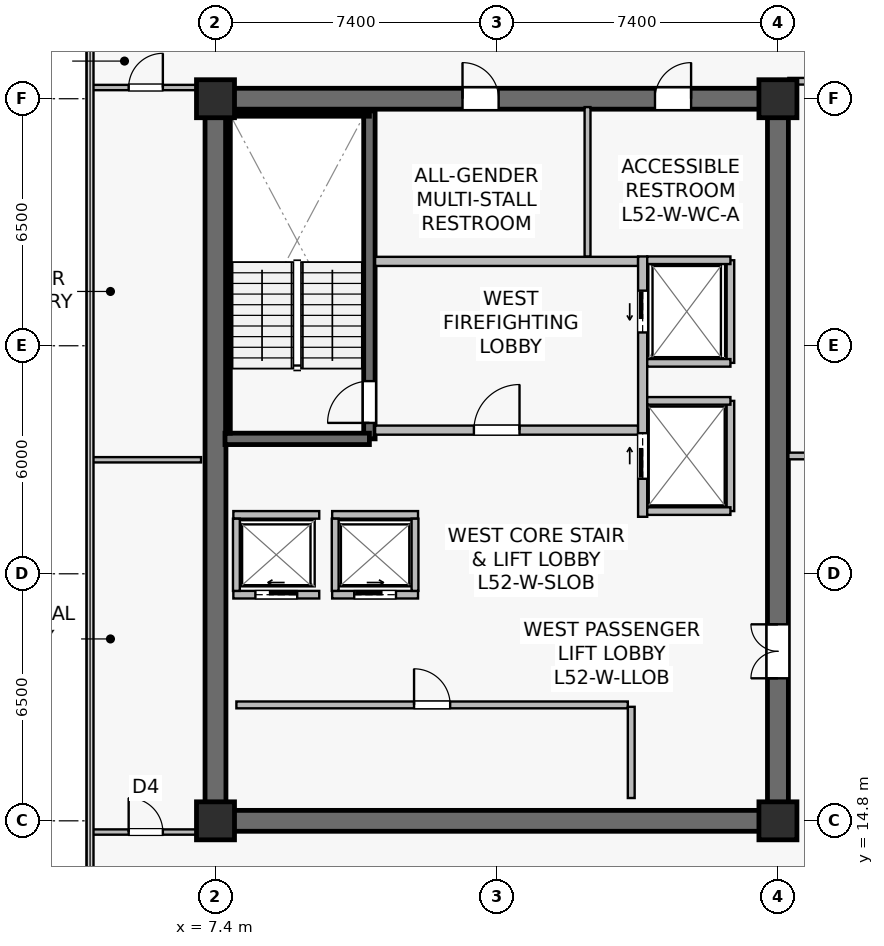
"""IFC4 building model, lengths in metres.
Left out: names, types, materials, properties, quantities, classifications, styles, units other than length and angle.
Written with IfcOpenShell. Run it as: python <this file> out.ifc"""

import sys

from ifc_helpers import new_model, si_unit, direction, frame, frame_2d, origin, origin_2d, place, context, subcontext, project, spatial, rectangle, extrude, source, transform, mapped, element, fill, save


model = new_model("IFC4")
c1 = context("Model", 3, precision=1e-05, world=origin(), true_north=direction((0.0, 1.0)))
c2 = subcontext(c1, "Body", "Model", "MODEL_VIEW")
j1 = project(units=[si_unit("LENGTHUNIT", "METRE"), si_unit("PLANEANGLEUNIT", "RADIAN")], contexts=[c1])
p1 = place(None, origin())
s1 = spatial("IfcSite", under=j1, at=p1, CompositionType="ELEMENT")
p2 = place(p1, origin())
s2 = spatial("IfcBuilding", under=s1, at=p2, CompositionType="ELEMENT")
p3 = place(p2, frame((0.0, 0.0, 217.8)))
s3 = spatial("IfcBuildingStorey", under=s2, at=p3, CompositionType="ELEMENT", Elevation=217.8)
p4 = place(p3, frame((7.125, 14.8, 0.0), z_axis=(0.0, 0.0, 1.0), x_axis=(1.0, 0.0, 0.0)))
e1 = element("IfcWall", 1, at=p4, inside=s3, PredefinedType="SHEAR", context=c2, shape_type="SweptSolid", body=[
    extrude(rectangle(XDim=15.35, YDim=0.55, at=frame_2d((7.675, 0.0))), origin(), (0.0, 0.0, 1.0), 3.8),
])
p5 = place(p3, frame((7.125, 33.8, 0.0), z_axis=(0.0, 0.0, 1.0), x_axis=(1.0, 0.0, 0.0)))
e2 = element("IfcWall", 2, at=p5, inside=s3, PredefinedType="SHEAR", context=c2, shape_type="SweptSolid", body=[
    extrude(rectangle(XDim=15.35, YDim=0.55, at=frame_2d((7.675, 0.0))), origin(), (0.0, 0.0, 1.0), 3.8),
])
p6 = place(p5, frame((6.775, 0.0, 0.0)))
e3 = element("IfcOpeningElement", 3, at=p6, cuts=e2, PredefinedType="OPENING", context=c2, shape_type="SweptSolid", body=[
    extrude(rectangle(XDim=0.95, YDim=2.15, at=frame_2d((0.475, 1.075))), frame((0.0, 0.285, 0.0), z_axis=(0.0, -1.0, 0.0), x_axis=(1.0, 0.0, 0.0)), (0.0, 0.0, 1.0), 0.57),
])
p7 = place(p5, frame((11.84, 0.0, 0.0)))
e4 = element("IfcOpeningElement", 4, at=p7, cuts=e2, PredefinedType="OPENING", context=c2, shape_type="SweptSolid", body=[
    extrude(rectangle(XDim=0.95, YDim=2.15, at=frame_2d((0.475, 1.075))), frame((0.0, 0.285, 0.0), z_axis=(0.0, -1.0, 0.0), x_axis=(1.0, 0.0, 0.0)), (0.0, 0.0, 1.0), 0.57),
])
p8 = place(p3, frame((7.4, 15.075, 0.0), z_axis=(0.0, 0.0, 1.0), x_axis=(0.0, 1.0, 0.0)))
e5 = element("IfcWall", 5, at=p8, inside=s3, PredefinedType="SHEAR", context=c2, shape_type="SweptSolid", body=[
    extrude(rectangle(XDim=18.45, YDim=0.55, at=frame_2d((9.225, 0.0))), origin(), (0.0, 0.0, 1.0), 3.8),
])
p9 = place(p3, frame((22.2, 15.075, 0.0), z_axis=(0.0, 0.0, 1.0), x_axis=(0.0, 1.0, 0.0)))
e6 = element("IfcWall", 6, at=p9, inside=s3, PredefinedType="SHEAR", context=c2, shape_type="SweptSolid", body=[
    extrude(rectangle(XDim=18.45, YDim=0.55, at=frame_2d((9.225, 0.0))), origin(), (0.0, 0.0, 1.0), 3.8),
])
p10 = place(p9, frame((3.475, 0.0, 0.0)))
e7 = element("IfcOpeningElement", 7, at=p10, cuts=e6, PredefinedType="OPENING", context=c2, shape_type="SweptSolid", body=[
    extrude(rectangle(XDim=1.42, YDim=2.2, at=frame_2d((0.71, 1.1))), frame((0.0, 0.285, 0.0), z_axis=(0.0, -1.0, 0.0), x_axis=(1.0, 0.0, 0.0)), (0.0, 0.0, 1.0), 0.57),
])
p11 = place(p3, frame((11.45, 24.85, 0.0), z_axis=(0.0, 0.0, 1.0), x_axis=(0.0, 1.0, 0.0)))
e8 = element("IfcWall", 8, at=p11, inside=s3, PredefinedType="SHEAR", context=c2, shape_type="SweptSolid", body=[
    extrude(rectangle(XDim=8.63, YDim=0.3, at=frame_2d((4.315, 0.0))), origin(), (0.0, 0.0, 1.0), 3.8),
])
p12 = place(p11, frame((0.42, 0.0, 0.0)))
e9 = element("IfcOpeningElement", 9, at=p12, cuts=e8, PredefinedType="OPENING", context=c2, shape_type="SweptSolid", body=[
    extrude(rectangle(XDim=1.1, YDim=2.15, at=frame_2d((0.55, 1.075))), frame((0.0, 0.16, 0.0), z_axis=(0.0, -1.0, 0.0), x_axis=(1.0, 0.0, 0.0)), (0.0, 0.0, 1.0), 0.32),
])
p13 = place(p3, frame((7.65, 24.85, 0.0), z_axis=(0.0, 0.0, 1.0), x_axis=(1.0, 0.0, 0.0)))
e10 = element("IfcWall", 10, at=p13, inside=s3, PredefinedType="SHEAR", context=c2, shape_type="SweptSolid", body=[
    extrude(rectangle(XDim=3.8, YDim=0.3, at=frame_2d((1.9, 0.0))), origin(), (0.0, 0.0, 1.0), 3.8),
])
p14 = place(p3, frame((7.73, 33.4, 0.0), z_axis=(0.0, 0.0, 1.0), x_axis=(1.0, 0.0, 0.0)))
e11 = element("IfcWall", 11, at=p14, inside=s3, PredefinedType="SOLIDWALL", context=c2, shape_type="SweptSolid", body=[
    extrude(rectangle(XDim=3.72, YDim=0.12, at=frame_2d((1.86, 0.0))), origin(), (0.0, 0.0, 1.0), 3.8),
])
p15 = place(p3, frame((7.73, 25.0, 0.0), z_axis=(0.0, 0.0, 1.0), x_axis=(0.0, 1.0, 0.0)))
e12 = element("IfcWall", 12, at=p15, inside=s3, PredefinedType="SOLIDWALL", context=c2, shape_type="SweptSolid", body=[
    extrude(rectangle(XDim=8.32, YDim=0.12, at=frame_2d((4.16, 0.0))), origin(), (0.0, 0.0, 1.0), 3.8),
])
m1 = source(origin(), c2, "Body", "SweptSolid", [
    extrude(rectangle(XDim=1.0, YDim=1.0, at=origin_2d()), origin(), (0.0, 0.0, 1.0), 4.1),
])
for number, where, z_axis, x_axis in (
    (13, (7.4, 14.8, 0.0), (0.0, 0.0, 1.0), (1.0, 0.0, 0.0)),
    (14, (22.2, 14.8, 0.0), (0.0, 0.0, 1.0), (1.0, 0.0, 0.0)),
    (15, (7.4, 33.8, 0.0), (0.0, 0.0, 1.0), (1.0, 0.0, 0.0)),
    (16, (22.2, 33.8, 0.0), (0.0, 0.0, 1.0), (1.0, 0.0, 0.0)),
):
    element("IfcColumn", number, at=place(p3, frame(where, z_axis=z_axis, x_axis=x_axis)), inside=s3, PredefinedType="COLUMN", context=c2, shape_type="MappedRepresentation", body=[
        mapped(m1, transform((0.0, 0.0, 0.0), scale=1.0)),
    ])
p16 = place(p3, frame((11.6, 25.08, 0.0), z_axis=(0.0, 0.0, 1.0), x_axis=(1.0, 0.0, 0.0)))
e17 = element("IfcWall", 17, at=p16, inside=s3, PredefinedType="SOLIDWALL", context=c2, shape_type="SweptSolid", body=[
    extrude(rectangle(XDim=6.92, YDim=0.24, at=frame_2d((3.46, 0.0))), origin(), (0.0, 0.0, 1.0), 3.197),
])
p17 = place(p16, frame((2.6, 0.0, 0.0)))
e18 = element("IfcOpeningElement", 18, at=p17, cuts=e17, PredefinedType="OPENING", context=c2, shape_type="SweptSolid", body=[
    extrude(rectangle(XDim=1.2, YDim=2.16, at=frame_2d((0.6, 1.08))), frame((0.0, 0.13, 0.0), z_axis=(0.0, -1.0, 0.0), x_axis=(1.0, 0.0, 0.0)), (0.0, 0.0, 1.0), 0.26),
])
p18 = place(p3, frame((11.6, 29.52, 0.0), z_axis=(0.0, 0.0, 1.0), x_axis=(1.0, 0.0, 0.0)))
e19 = element("IfcWall", 19, at=p18, inside=s3, PredefinedType="SOLIDWALL", context=c2, shape_type="SweptSolid", body=[
    extrude(rectangle(XDim=6.92, YDim=0.24, at=frame_2d((3.46, 0.0))), origin(), (0.0, 0.0, 1.0), 3.197),
])
p19 = place(p3, frame((18.64, 22.8, 0.0), z_axis=(0.0, 0.0, 1.0), x_axis=(0.0, 1.0, 0.0)))
e20 = element("IfcWall", 20, at=p19, inside=s3, PredefinedType="SOLIDWALL", context=c2, shape_type="SweptSolid", body=[
    extrude(rectangle(XDim=6.85, YDim=0.24, at=frame_2d((3.425, 0.0))), origin(), (0.0, 0.0, 1.0), 2.935),
])
p20 = place(p19, frame((4.85, 0.0, 0.0)))
e21 = element("IfcOpeningElement", 21, at=p20, cuts=e20, PredefinedType="OPENING", context=c2, shape_type="SweptSolid", body=[
    extrude(rectangle(XDim=1.1, YDim=2.22, at=frame_2d((0.55, 1.11))), frame((0.0, 0.13, 0.0), z_axis=(0.0, -1.0, 0.0), x_axis=(1.0, 0.0, 0.0)), (0.0, 0.0, 1.0), 0.26),
])
p21 = place(p19, frame((1.0, 0.0, 0.0)))
e22 = element("IfcOpeningElement", 22, at=p21, cuts=e20, PredefinedType="OPENING", context=c2, shape_type="SweptSolid", body=[
    extrude(rectangle(XDim=1.2, YDim=2.22, at=frame_2d((0.6, 1.11))), frame((0.0, 0.13, 0.0), z_axis=(0.0, -1.0, 0.0), x_axis=(1.0, 0.0, 0.0)), (0.0, 0.0, 1.0), 0.26),
])
p22 = place(p3, frame((7.87, 20.75, 0.0), z_axis=(0.0, 0.0, 1.0), x_axis=(1.0, 0.0, 0.0)))
e23 = element("IfcWall", 23, at=p22, inside=s3, PredefinedType="SOLIDWALL", context=c2, shape_type="SweptSolid", body=[
    extrude(rectangle(XDim=2.26, YDim=0.2, at=frame_2d((1.13, 0.0))), origin(), (0.0, 0.0, 1.0), 3.8),
])
p23 = place(p22, frame((0.58, 0.0, 0.0)))
e24 = element("IfcOpeningElement", 24, at=p23, cuts=e23, PredefinedType="OPENING", context=c2, shape_type="SweptSolid", body=[
    extrude(rectangle(XDim=1.1, YDim=2.22, at=frame_2d((0.55, 1.11))), frame((0.0, 0.11, 0.0), z_axis=(0.0, -1.0, 0.0), x_axis=(1.0, 0.0, 0.0)), (0.0, 0.0, 1.0), 0.22),
])
p24 = place(p3, frame((7.87, 22.85, 0.0), z_axis=(0.0, 0.0, 1.0), x_axis=(1.0, 0.0, 0.0)))
e25 = element("IfcWall", 25, at=p24, inside=s3, PredefinedType="SOLIDWALL", context=c2, shape_type="SweptSolid", body=[
    extrude(rectangle(XDim=2.26, YDim=0.2, at=frame_2d((1.13, 0.0))), origin(), (0.0, 0.0, 1.0), 3.8),
])
p25 = place(p3, frame((7.95, 20.85, 0.0), z_axis=(0.0, 0.0, 1.0), x_axis=(0.0, 1.0, 0.0)))
e26 = element("IfcWall", 26, at=p25, inside=s3, PredefinedType="SOLIDWALL", context=c2, shape_type="SweptSolid", body=[
    extrude(rectangle(XDim=1.9, YDim=0.18, at=frame_2d((0.95, 0.0))), origin(), (0.0, 0.0, 1.0), 3.8),
])
p26 = place(p3, frame((10.47, 20.75, 0.0), z_axis=(0.0, 0.0, 1.0), x_axis=(1.0, 0.0, 0.0)))
e27 = element("IfcWall", 27, at=p26, inside=s3, PredefinedType="SOLIDWALL", context=c2, shape_type="SweptSolid", body=[
    extrude(rectangle(XDim=2.26, YDim=0.2, at=frame_2d((1.13, 0.0))), origin(), (0.0, 0.0, 1.0), 3.8),
])
p27 = place(p26, frame((0.58, 0.0, 0.0)))
e28 = element("IfcOpeningElement", 28, at=p27, cuts=e27, PredefinedType="OPENING", context=c2, shape_type="SweptSolid", body=[
    extrude(rectangle(XDim=1.1, YDim=2.22, at=frame_2d((0.55, 1.11))), frame((0.0, 0.11, 0.0), z_axis=(0.0, -1.0, 0.0), x_axis=(1.0, 0.0, 0.0)), (0.0, 0.0, 1.0), 0.22),
])
p28 = place(p3, frame((10.47, 22.85, 0.0), z_axis=(0.0, 0.0, 1.0), x_axis=(1.0, 0.0, 0.0)))
e29 = element("IfcWall", 29, at=p28, inside=s3, PredefinedType="SOLIDWALL", context=c2, shape_type="SweptSolid", body=[
    extrude(rectangle(XDim=2.26, YDim=0.2, at=frame_2d((1.13, 0.0))), origin(), (0.0, 0.0, 1.0), 3.8),
])
for number, where, z_axis, x_axis in (
    (30, (10.55, 20.85, 0.0), (0.0, 0.0, 1.0), (0.0, 1.0, 0.0)),
    (31, (12.65, 20.85, 0.0), (0.0, 0.0, 1.0), (0.0, 1.0, 0.0)),
):
    element("IfcWall", number, at=place(p3, frame(where, z_axis=z_axis, x_axis=x_axis)), inside=s3, PredefinedType="SOLIDWALL", context=c2, shape_type="SweptSolid", body=[
        extrude(rectangle(XDim=1.9, YDim=0.18, at=frame_2d((0.95, 0.0))), origin(), (0.0, 0.0, 1.0), 3.8),
    ])
p29 = place(p3, frame((20.95, 26.85, 0.0), z_axis=(0.0, 0.0, 1.0), x_axis=(0.0, 1.0, 0.0)))
e32 = element("IfcWall", 32, at=p29, inside=s3, PredefinedType="SOLIDWALL", context=c2, shape_type="SweptSolid", body=[
    extrude(rectangle(XDim=2.7, YDim=0.2, at=frame_2d((1.35, 0.0))), origin(), (0.0, 0.0, 1.0), 3.8),
])
p30 = place(p3, frame((18.76, 29.55, 0.0), z_axis=(0.0, 0.0, 1.0), x_axis=(1.0, 0.0, 0.0)))
e33 = element("IfcWall", 33, at=p30, inside=s3, PredefinedType="SOLIDWALL", context=c2, shape_type="SweptSolid", body=[
    extrude(rectangle(XDim=2.19, YDim=0.2, at=frame_2d((1.095, 0.0))), origin(), (0.0, 0.0, 1.0), 3.8),
])
p31 = place(p3, frame((18.76, 26.85, 0.0), z_axis=(0.0, 0.0, 1.0), x_axis=(1.0, 0.0, 0.0)))
e34 = element("IfcWall", 34, at=p31, inside=s3, PredefinedType="SOLIDWALL", context=c2, shape_type="SweptSolid", body=[
    extrude(rectangle(XDim=2.19, YDim=0.2, at=frame_2d((1.095, 0.0))), origin(), (0.0, 0.0, 1.0), 3.197),
])
p32 = place(p3, frame((20.95, 22.95, 0.0), z_axis=(0.0, 0.0, 1.0), x_axis=(0.0, 1.0, 0.0)))
e35 = element("IfcWall", 35, at=p32, inside=s3, PredefinedType="SOLIDWALL", context=c2, shape_type="SweptSolid", body=[
    extrude(rectangle(XDim=2.9, YDim=0.2, at=frame_2d((1.45, 0.0))), origin(), (0.0, 0.0, 1.0), 2.935),
])
for number, where, z_axis, x_axis in (
    (36, (18.76, 25.85, 0.0), (0.0, 0.0, 1.0), (1.0, 0.0, 0.0)),
    (37, (18.76, 22.95, 0.0), (0.0, 0.0, 1.0), (1.0, 0.0, 0.0)),
):
    element("IfcWall", number, at=place(p3, frame(where, z_axis=z_axis, x_axis=x_axis)), inside=s3, PredefinedType="SOLIDWALL", context=c2, shape_type="SweptSolid", body=[
        extrude(rectangle(XDim=2.19, YDim=0.2, at=frame_2d((1.095, 0.0))), origin(), (0.0, 0.0, 1.0), 3.8),
    ])
p33 = place(p3, frame((7.95, 17.85, 0.0), z_axis=(0.0, 0.0, 1.0), x_axis=(1.0, 0.0, 0.0)))
e38 = element("IfcWall", 38, at=p33, inside=s3, PredefinedType="SOLIDWALL", context=c2, shape_type="SweptSolid", body=[
    extrude(rectangle(XDim=10.3, YDim=0.18, at=frame_2d((5.15, 0.0))), origin(), (0.0, 0.0, 1.0), 3.197),
])
p34 = place(p33, frame((4.675, 0.0, 0.0)))
e39 = element("IfcOpeningElement", 39, at=p34, cuts=e38, PredefinedType="OPENING", context=c2, shape_type="SweptSolid", body=[
    extrude(rectangle(XDim=0.95, YDim=2.15, at=frame_2d((0.475, 1.075))), frame((0.0, 0.1, 0.0), z_axis=(0.0, -1.0, 0.0), x_axis=(1.0, 0.0, 0.0)), (0.0, 0.0, 1.0), 0.2),
])
p35 = place(p3, frame((18.34, 15.4, 0.0), z_axis=(0.0, 0.0, 1.0), x_axis=(0.0, 1.0, 0.0)))
e40 = element("IfcWall", 40, at=p35, inside=s3, PredefinedType="SOLIDWALL", context=c2, shape_type="SweptSolid", body=[
    extrude(rectangle(XDim=2.4, YDim=0.18, at=frame_2d((1.2, 0.0))), origin(), (0.0, 0.0, 1.0), 3.8),
])
p36 = place(p3, frame((17.19, 29.65, 0.0), z_axis=(0.0, 0.0, 1.0), x_axis=(0.0, 1.0, 0.0)))
e41 = element("IfcWall", 41, at=p36, inside=s3, PredefinedType="PLUMBINGWALL", context=c2, shape_type="SweptSolid", body=[
    extrude(rectangle(XDim=3.93, YDim=0.155, at=frame_2d((1.965, 0.0))), origin(), (0.0, 0.0, 1.0), 3.8),
])
p37 = place(p3, frame((22.475, 34.26, 0.0), z_axis=(0.0, 0.0, 1.0), x_axis=(1.0, 0.0, 0.0)))
e42 = element("IfcWall", 42, at=p37, inside=s3, PredefinedType="PARTITIONING", context=c2, shape_type="SweptSolid", body=[
    extrude(rectangle(XDim=4.025, YDim=0.175, at=frame_2d((2.012, 0.0))), origin(), (0.0, 0.0, 1.0), 3.485),
])
p38 = place(p3, frame((22.475, 24.4, 0.0), z_axis=(0.0, 0.0, 1.0), x_axis=(1.0, 0.0, 0.0)))
e43 = element("IfcWall", 43, at=p38, inside=s3, PredefinedType="PARTITIONING", context=c2, shape_type="SweptSolid", body=[
    extrude(rectangle(XDim=4.025, YDim=0.175, at=frame_2d((2.012, 0.0))), origin(), (0.0, 0.0, 1.0), 3.8),
])
p39 = place(p38, frame((1.35, 0.0, 0.0)))
e44 = element("IfcOpeningElement", 44, at=p39, cuts=e43, PredefinedType="OPENING", context=c2, shape_type="SweptSolid", body=[
    extrude(rectangle(XDim=0.95, YDim=2.15, at=frame_2d((0.475, 1.075))), frame((0.0, 0.098, 0.0), z_axis=(0.0, -1.0, 0.0), x_axis=(1.0, 0.0, 0.0)), (0.0, 0.0, 1.0), 0.195),
])
p40 = place(p3, frame((4.11, 24.3, 0.0), z_axis=(0.0, 0.0, 1.0), x_axis=(1.0, 0.0, 0.0)))
e45 = element("IfcWall", 45, at=p40, inside=s3, PredefinedType="PARTITIONING", context=c2, shape_type="SweptSolid", body=[
    extrude(rectangle(XDim=2.91, YDim=0.14, at=frame_2d((1.455, 0.0))), origin(), (0.0, 0.0, 1.0), 3.8),
])
p41 = place(p3, frame((4.11, 14.505, 0.0), z_axis=(0.0, 0.0, 1.0), x_axis=(1.0, 0.0, 0.0)))
e46 = element("IfcWall", 46, at=p41, inside=s3, PredefinedType="PARTITIONING", context=c2, shape_type="SweptSolid", body=[
    extrude(rectangle(XDim=2.91, YDim=0.14, at=frame_2d((1.455, 0.0))), origin(), (0.0, 0.0, 1.0), 3.8),
])
p42 = place(p41, frame((1.005, 0.0, 0.0)))
e47 = element("IfcOpeningElement", 47, at=p42, cuts=e46, PredefinedType="OPENING", context=c2, shape_type="SweptSolid", body=[
    extrude(rectangle(XDim=0.9, YDim=2.1, at=frame_2d((0.45, 1.05))), frame((0.0, 0.08, 0.0), z_axis=(0.0, -1.0, 0.0), x_axis=(1.0, 0.0, 0.0)), (0.0, 0.0, 1.0), 0.16),
])
p43 = place(p3, frame((4.11, 34.095, 0.0), z_axis=(0.0, 0.0, 1.0), x_axis=(1.0, 0.0, 0.0)))
e48 = element("IfcWall", 48, at=p43, inside=s3, PredefinedType="PARTITIONING", context=c2, shape_type="SweptSolid", body=[
    extrude(rectangle(XDim=2.91, YDim=0.14, at=frame_2d((1.455, 0.0))), origin(), (0.0, 0.0, 1.0), 3.8),
])
p44 = place(p43, frame((1.005, 0.0, 0.0)))
e49 = element("IfcOpeningElement", 49, at=p44, cuts=e48, PredefinedType="OPENING", context=c2, shape_type="SweptSolid", body=[
    extrude(rectangle(XDim=0.9, YDim=2.1, at=frame_2d((0.45, 1.05))), frame((0.0, 0.08, 0.0), z_axis=(0.0, -1.0, 0.0), x_axis=(1.0, 0.0, 0.0)), (0.0, 0.0, 1.0), 0.16),
])
m2 = source(origin(), c2, "Body", "SweptSolid", [
    extrude(rectangle(XDim=1.1, YDim=2.15, at=frame_2d((0.55, 1.075))), frame((0.0, 0.025, 0.0), z_axis=(0.0, -1.0, 0.0), x_axis=(1.0, 0.0, 0.0)), (0.0, 0.0, 1.0), 0.05),
])
p45 = place(p12, origin())
e50 = element("IfcDoor", 50, at=p45, inside=s3, OperationType="SINGLE_SWING_LEFT", PredefinedType="DOOR", context=c2, shape_type="MappedRepresentation", body=[
    mapped(m2, transform((0.0, 0.0, 0.0), scale=1.0)),
])
fill(e9, e50)
m3 = source(origin(), c2, "Body", "SweptSolid", [
    extrude(rectangle(XDim=1.2, YDim=2.16, at=frame_2d((0.6, 1.08))), frame((0.0, 0.025, 0.0), z_axis=(0.0, -1.0, 0.0), x_axis=(1.0, 0.0, 0.0)), (0.0, 0.0, 1.0), 0.05),
])
p46 = place(p17, origin())
e51 = element("IfcDoor", 51, at=p46, inside=s3, OperationType="SINGLE_SWING_RIGHT", PredefinedType="DOOR", context=c2, shape_type="MappedRepresentation", body=[
    mapped(m3, transform((0.0, 0.0, 0.0), scale=1.0)),
])
fill(e18, e51)
m4 = source(origin(), c2, "Body", "SweptSolid", [
    extrude(rectangle(XDim=1.1, YDim=2.22, at=frame_2d((0.55, 1.11))), frame((0.0, 0.025, 0.0), z_axis=(0.0, -1.0, 0.0), x_axis=(1.0, 0.0, 0.0)), (0.0, 0.0, 1.0), 0.05),
])
p47 = place(p23, origin())
e52 = element("IfcDoor", 52, at=p47, inside=s3, OperationType="SLIDING_TO_LEFT", PredefinedType="USERDEFINED", context=c2, shape_type="MappedRepresentation", body=[
    mapped(m4, transform((0.0, 0.0, 0.0), scale=1.0)),
])
fill(e24, e52)
p48 = place(p27, origin())
e53 = element("IfcDoor", 53, at=p48, inside=s3, OperationType="SLIDING_TO_RIGHT", PredefinedType="USERDEFINED", context=c2, shape_type="MappedRepresentation", body=[
    mapped(m4, transform((0.0, 0.0, 0.0), scale=1.0)),
])
fill(e28, e53)
p49 = place(p20, origin())
e54 = element("IfcDoor", 54, at=p49, inside=s3, OperationType="SLIDING_TO_LEFT", PredefinedType="USERDEFINED", context=c2, shape_type="MappedRepresentation", body=[
    mapped(m4, transform((0.0, 0.0, 0.0), scale=1.0)),
])
fill(e21, e54)
m5 = source(origin(), c2, "Body", "SweptSolid", [
    extrude(rectangle(XDim=1.2, YDim=2.22, at=frame_2d((0.6, 1.11))), frame((0.0, 0.025, 0.0), z_axis=(0.0, -1.0, 0.0), x_axis=(1.0, 0.0, 0.0)), (0.0, 0.0, 1.0), 0.05),
])
p50 = place(p21, origin())
e55 = element("IfcDoor", 55, at=p50, inside=s3, OperationType="SLIDING_TO_RIGHT", PredefinedType="USERDEFINED", context=c2, shape_type="MappedRepresentation", body=[
    mapped(m5, transform((0.0, 0.0, 0.0), scale=1.0)),
])
fill(e22, e55)
m6 = source(origin(), c2, "Body", "SweptSolid", [
    extrude(rectangle(XDim=0.95, YDim=2.15, at=frame_2d((0.475, 1.075))), frame((0.0, 0.025, 0.0), z_axis=(0.0, -1.0, 0.0), x_axis=(1.0, 0.0, 0.0)), (0.0, 0.0, 1.0), 0.05),
])
p51 = place(p34, origin())
e56 = element("IfcDoor", 56, at=p51, inside=s3, OperationType="SINGLE_SWING_LEFT", PredefinedType="DOOR", context=c2, shape_type="MappedRepresentation", body=[
    mapped(m6, transform((0.0, 0.0, 0.0), scale=1.0)),
])
fill(e39, e56)
m7 = source(origin(), c2, "Body", "SweptSolid", [
    extrude(rectangle(XDim=1.42, YDim=2.2, at=frame_2d((0.71, 1.1))), frame((0.0, 0.025, 0.0), z_axis=(0.0, -1.0, 0.0), x_axis=(1.0, 0.0, 0.0)), (0.0, 0.0, 1.0), 0.05),
])
p52 = place(p10, origin())
e57 = element("IfcDoor", 57, at=p52, inside=s3, OperationType="DOUBLE_DOOR_SINGLE_SWING", PredefinedType="DOOR", context=c2, shape_type="MappedRepresentation", body=[
    mapped(m7, transform((0.0, 0.0, 0.0), scale=1.0)),
])
fill(e7, e57)
p53 = place(p6, origin())
e58 = element("IfcDoor", 58, at=p53, inside=s3, OperationType="SINGLE_SWING_LEFT", PredefinedType="DOOR", context=c2, shape_type="MappedRepresentation", body=[
    mapped(m6, transform((0.0, 0.0, 0.0), scale=1.0)),
])
fill(e3, e58)
p54 = place(p7, origin())
e59 = element("IfcDoor", 59, at=p54, inside=s3, OperationType="SINGLE_SWING_RIGHT", PredefinedType="DOOR", context=c2, shape_type="MappedRepresentation", body=[
    mapped(m6, transform((0.0, 0.0, 0.0), scale=1.0)),
])
fill(e4, e59)
m8 = source(origin(), c2, "Body", "SweptSolid", [
    extrude(rectangle(XDim=0.9, YDim=2.1, at=frame_2d((0.45, 1.05))), frame((0.0, 0.025, 0.0), z_axis=(0.0, -1.0, 0.0), x_axis=(1.0, 0.0, 0.0)), (0.0, 0.0, 1.0), 0.05),
])
p55 = place(p42, origin())
e60 = element("IfcDoor", 60, at=p55, inside=s3, OperationType="SINGLE_SWING_LEFT", PredefinedType="DOOR", context=c2, shape_type="MappedRepresentation", body=[
    mapped(m8, transform((0.0, 0.0, 0.0), scale=1.0)),
])
fill(e47, e60)
p56 = place(p44, origin())
e61 = element("IfcDoor", 61, at=p56, inside=s3, OperationType="SINGLE_SWING_RIGHT", PredefinedType="DOOR", context=c2, shape_type="MappedRepresentation", body=[
    mapped(m8, transform((0.0, 0.0, 0.0), scale=1.0)),
])
fill(e49, e61)
save(model, sys.argv[1])
